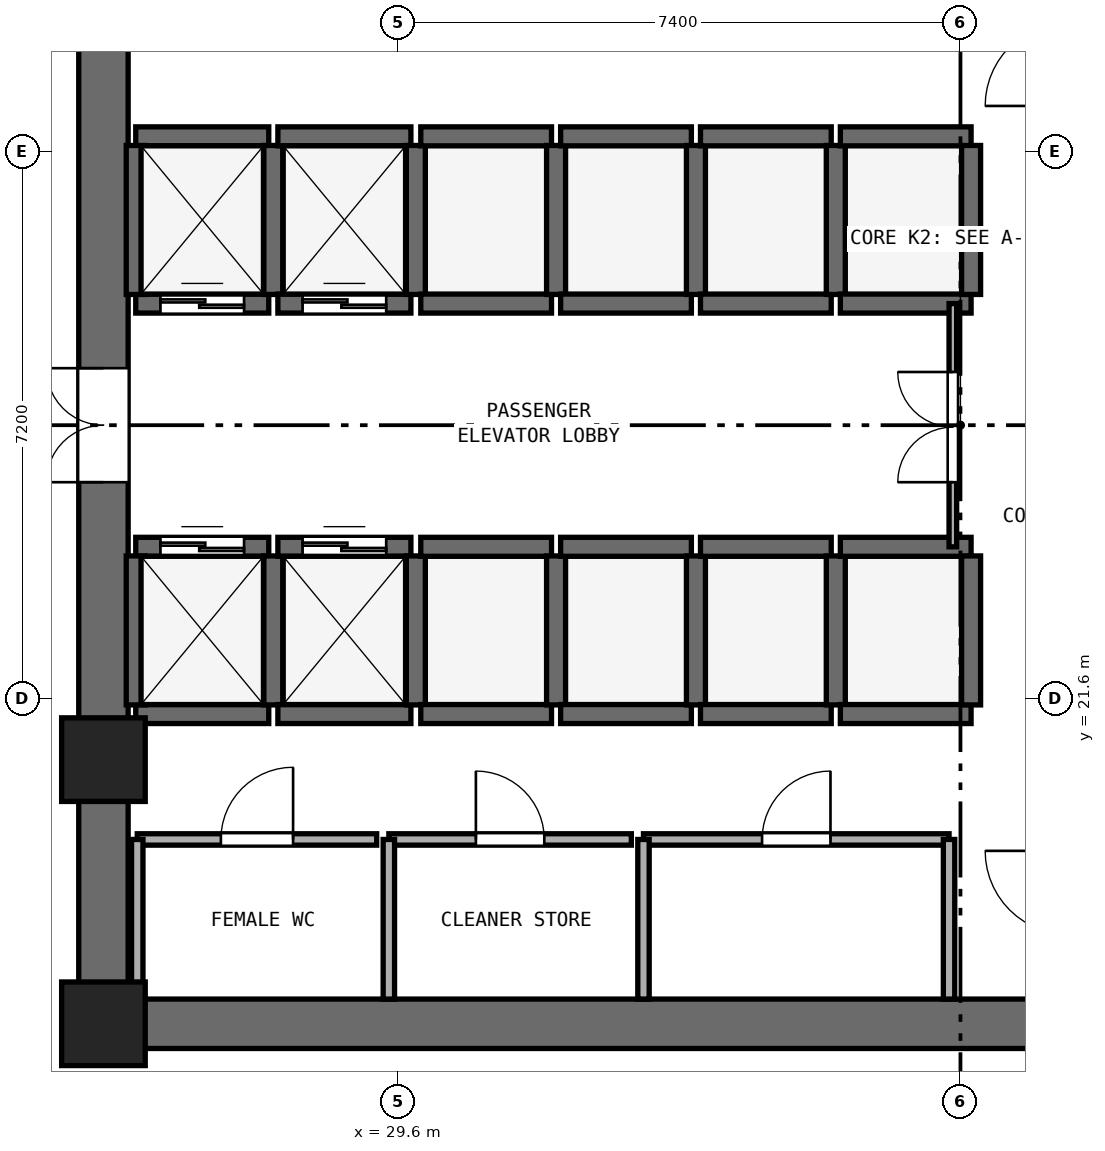
"""IFC4 building model, lengths in metres.
Left out: names, types, materials, properties, quantities, classifications, styles, units other than length and angle.
Written with IfcOpenShell. Run it as: python <this file> out.ifc"""

import sys

from ifc_helpers import new_model, si_unit, direction, frame, frame_2d, origin, origin_2d, place, context, subcontext, project, spatial, rectangle, extrude, element, fill, save


model = new_model("IFC4")
c1 = context("Model", 3, precision=1e-05, world=origin(), true_north=direction((0.0, 1.0)))
c2 = subcontext(c1, "Body", "Model", "MODEL_VIEW")
j1 = project(units=[si_unit("LENGTHUNIT", "METRE"), si_unit("PLANEANGLEUNIT", "RADIAN")], contexts=[c1])
p1 = place(None, origin())
s1 = spatial("IfcSite", under=j1, at=p1, CompositionType="ELEMENT")
p2 = place(p1, origin())
s2 = spatial("IfcBuilding", under=s1, at=p2, CompositionType="ELEMENT")
p3 = place(p2, frame((0.0, 0.0, 5.0)))
s3 = spatial("IfcBuildingStorey", under=s2, at=p3, CompositionType="ELEMENT", Elevation=5.0)
p4 = place(p3, frame((25.4, 17.325, 0.0), z_axis=(0.0, 0.0, 1.0), x_axis=(1.0, 0.0, 0.0)))
e1 = element("IfcWall", 1, at=p4, inside=s3, PredefinedType="SHEAR", context=c2, shape_type="SweptSolid", body=[
    extrude(rectangle(XDim=23.2, YDim=0.65, at=frame_2d((11.6, 0.0))), origin(), (0.0, 0.0, 1.0), 4.66),
])
p5 = place(p3, frame((25.725, 17.65, 0.0), z_axis=(0.0, 0.0, 1.0), x_axis=(0.0, 1.0, 0.0)))
e2 = element("IfcWall", 2, at=p5, inside=s3, PredefinedType="SHEAR", context=c2, shape_type="SweptSolid", body=[
    extrude(rectangle(XDim=15.1, YDim=0.65, at=frame_2d((7.55, 0.0))), origin(), (0.0, 0.0, 1.0), 4.66),
])
p6 = place(p5, frame((6.8, 0.0, 0.0)))
e3 = element("IfcOpeningElement", 3, at=p6, cuts=e2, PredefinedType="OPENING", context=c2, shape_type="SweptSolid", body=[
    extrude(rectangle(XDim=1.5, YDim=2.15, at=frame_2d((0.75, 1.075))), frame((0.0, 0.335, 0.0), z_axis=(0.0, -1.0, 0.0), x_axis=(1.0, 0.0, 0.0)), (0.0, 0.0, 1.0), 0.67),
])
for number, where, z_axis, x_axis in (
    (4, (25.725, 17.325, 0.0), (0.0, 0.0, 1.0), (1.0, 0.0, 0.0)),
    (5, (25.725, 20.8, 0.0), (0.0, 0.0, 1.0), (1.0, 0.0, 0.0)),
):
    element("IfcColumn", number, at=place(p3, frame(where, z_axis=z_axis, x_axis=x_axis)), inside=s3, PredefinedType="PILASTER", context=c2, shape_type="SweptSolid", body=[
        extrude(rectangle(XDim=1.1, YDim=1.1, at=origin_2d()), origin(), (0.0, 0.0, 1.0), 5.0),
    ])
p7 = place(p3, frame((26.15, 26.8, 0.0), z_axis=(0.0, 0.0, 1.0), x_axis=(1.0, 0.0, 0.0)))
e6 = element("IfcWall", 6, at=p7, inside=s3, PredefinedType="SHEAR", context=c2, shape_type="SweptSolid", body=[
    extrude(rectangle(XDim=1.75, YDim=0.25, at=frame_2d((0.875, 0.0))), origin(), (0.0, 0.0, 1.0), 4.66),
])
p8 = place(p7, frame((0.325, 0.0, 0.0)))
e7 = element("IfcOpeningElement", 7, at=p8, cuts=e6, PredefinedType="OPENING", context=c2, shape_type="SweptSolid", body=[
    extrude(rectangle(XDim=1.1, YDim=2.15, at=frame_2d((0.55, 1.075))), frame((0.0, 0.135, 0.0), z_axis=(0.0, -1.0, 0.0), x_axis=(1.0, 0.0, 0.0)), (0.0, 0.0, 1.0), 0.27),
])
p9 = place(p3, frame((26.15, 29.0, 0.0), z_axis=(0.0, 0.0, 1.0), x_axis=(1.0, 0.0, 0.0)))
e8 = element("IfcWall", 8, at=p9, inside=s3, PredefinedType="SHEAR", context=c2, shape_type="SweptSolid", body=[
    extrude(rectangle(XDim=1.75, YDim=0.25, at=frame_2d((0.875, 0.0))), origin(), (0.0, 0.0, 1.0), 4.66),
])
for number, where, z_axis, x_axis in (
    (9, (26.15, 26.92, 0.0), (0.0, 0.0, 1.0), (0.0, 1.0, 0.0)),
    (10, (27.96, 26.92, 0.0), (0.0, 0.0, 1.0), (0.0, 1.0, 0.0)),
):
    element("IfcWall", number, at=place(p3, frame(where, z_axis=z_axis, x_axis=x_axis)), inside=s3, PredefinedType="SHEAR", context=c2, shape_type="SweptSolid", body=[
        extrude(rectangle(XDim=1.96, YDim=0.25, at=frame_2d((0.98, 0.0))), origin(), (0.0, 0.0, 1.0), 4.66),
    ])
p10 = place(p3, frame((28.02, 26.8, 0.0), z_axis=(0.0, 0.0, 1.0), x_axis=(1.0, 0.0, 0.0)))
e11 = element("IfcWall", 11, at=p10, inside=s3, PredefinedType="SHEAR", context=c2, shape_type="SweptSolid", body=[
    extrude(rectangle(XDim=1.75, YDim=0.25, at=frame_2d((0.875, 0.0))), origin(), (0.0, 0.0, 1.0), 4.66),
])
p11 = place(p10, frame((0.325, 0.0, 0.0)))
e12 = element("IfcOpeningElement", 12, at=p11, cuts=e11, PredefinedType="OPENING", context=c2, shape_type="SweptSolid", body=[
    extrude(rectangle(XDim=1.1, YDim=2.15, at=frame_2d((0.55, 1.075))), frame((0.0, 0.135, 0.0), z_axis=(0.0, -1.0, 0.0), x_axis=(1.0, 0.0, 0.0)), (0.0, 0.0, 1.0), 0.27),
])
p12 = place(p3, frame((28.02, 29.0, 0.0), z_axis=(0.0, 0.0, 1.0), x_axis=(1.0, 0.0, 0.0)))
e13 = element("IfcWall", 13, at=p12, inside=s3, PredefinedType="SHEAR", context=c2, shape_type="SweptSolid", body=[
    extrude(rectangle(XDim=1.75, YDim=0.25, at=frame_2d((0.875, 0.0))), origin(), (0.0, 0.0, 1.0), 4.66),
])
p13 = place(p3, frame((29.835, 26.92, 0.0), z_axis=(0.0, 0.0, 1.0), x_axis=(0.0, 1.0, 0.0)))
e14 = element("IfcWall", 14, at=p13, inside=s3, PredefinedType="SHEAR", context=c2, shape_type="SweptSolid", body=[
    extrude(rectangle(XDim=1.96, YDim=0.25, at=frame_2d((0.98, 0.0))), origin(), (0.0, 0.0, 1.0), 4.66),
])
p14 = place(p3, frame((26.15, 21.4, 0.0), z_axis=(0.0, 0.0, 1.0), x_axis=(1.0, 0.0, 0.0)))
e15 = element("IfcWall", 15, at=p14, inside=s3, PredefinedType="SHEAR", context=c2, shape_type="SweptSolid", body=[
    extrude(rectangle(XDim=1.75, YDim=0.25, at=frame_2d((0.875, 0.0))), origin(), (0.0, 0.0, 1.0), 4.66),
])
p15 = place(p3, frame((26.15, 23.6, 0.0), z_axis=(0.0, 0.0, 1.0), x_axis=(1.0, 0.0, 0.0)))
e16 = element("IfcWall", 16, at=p15, inside=s3, PredefinedType="SHEAR", context=c2, shape_type="SweptSolid", body=[
    extrude(rectangle(XDim=1.75, YDim=0.25, at=frame_2d((0.875, 0.0))), origin(), (0.0, 0.0, 1.0), 4.66),
])
p16 = place(p15, frame((0.325, 0.0, 0.0)))
e17 = element("IfcOpeningElement", 17, at=p16, cuts=e16, PredefinedType="OPENING", context=c2, shape_type="SweptSolid", body=[
    extrude(rectangle(XDim=1.1, YDim=2.15, at=frame_2d((0.55, 1.075))), frame((0.0, 0.135, 0.0), z_axis=(0.0, -1.0, 0.0), x_axis=(1.0, 0.0, 0.0)), (0.0, 0.0, 1.0), 0.27),
])
for number, where, z_axis, x_axis in (
    (18, (26.15, 21.52, 0.0), (0.0, 0.0, 1.0), (0.0, 1.0, 0.0)),
    (19, (27.96, 21.52, 0.0), (0.0, 0.0, 1.0), (0.0, 1.0, 0.0)),
):
    element("IfcWall", number, at=place(p3, frame(where, z_axis=z_axis, x_axis=x_axis)), inside=s3, PredefinedType="SHEAR", context=c2, shape_type="SweptSolid", body=[
        extrude(rectangle(XDim=1.96, YDim=0.25, at=frame_2d((0.98, 0.0))), origin(), (0.0, 0.0, 1.0), 4.66),
    ])
p17 = place(p3, frame((28.02, 21.4, 0.0), z_axis=(0.0, 0.0, 1.0), x_axis=(1.0, 0.0, 0.0)))
e20 = element("IfcWall", 20, at=p17, inside=s3, PredefinedType="SHEAR", context=c2, shape_type="SweptSolid", body=[
    extrude(rectangle(XDim=1.75, YDim=0.25, at=frame_2d((0.875, 0.0))), origin(), (0.0, 0.0, 1.0), 4.66),
])
p18 = place(p3, frame((28.02, 23.6, 0.0), z_axis=(0.0, 0.0, 1.0), x_axis=(1.0, 0.0, 0.0)))
e21 = element("IfcWall", 21, at=p18, inside=s3, PredefinedType="SHEAR", context=c2, shape_type="SweptSolid", body=[
    extrude(rectangle(XDim=1.75, YDim=0.25, at=frame_2d((0.875, 0.0))), origin(), (0.0, 0.0, 1.0), 4.66),
])
p19 = place(p18, frame((0.325, 0.0, 0.0)))
e22 = element("IfcOpeningElement", 22, at=p19, cuts=e21, PredefinedType="OPENING", context=c2, shape_type="SweptSolid", body=[
    extrude(rectangle(XDim=1.1, YDim=2.15, at=frame_2d((0.55, 1.075))), frame((0.0, 0.135, 0.0), z_axis=(0.0, -1.0, 0.0), x_axis=(1.0, 0.0, 0.0)), (0.0, 0.0, 1.0), 0.27),
])
p20 = place(p3, frame((29.835, 21.52, 0.0), z_axis=(0.0, 0.0, 1.0), x_axis=(0.0, 1.0, 0.0)))
e23 = element("IfcWall", 23, at=p20, inside=s3, PredefinedType="SHEAR", context=c2, shape_type="SweptSolid", body=[
    extrude(rectangle(XDim=1.96, YDim=0.25, at=frame_2d((0.98, 0.0))), origin(), (0.0, 0.0, 1.0), 4.66),
])
for number, where, z_axis, x_axis in (
    (24, (29.9, 21.4, 0.0), (0.0, 0.0, 1.0), (1.0, 0.0, 0.0)),
    (25, (29.9, 23.6, 0.0), (0.0, 0.0, 1.0), (1.0, 0.0, 0.0)),
):
    element("IfcWall", number, at=place(p3, frame(where, z_axis=z_axis, x_axis=x_axis)), inside=s3, PredefinedType="SHEAR", context=c2, shape_type="SweptSolid", body=[
        extrude(rectangle(XDim=1.72, YDim=0.25, at=frame_2d((0.86, 0.0))), origin(), (0.0, 0.0, 1.0), 4.66),
    ])
p21 = place(p3, frame((31.68, 21.52, 0.0), z_axis=(0.0, 0.0, 1.0), x_axis=(0.0, 1.0, 0.0)))
e26 = element("IfcWall", 26, at=p21, inside=s3, PredefinedType="SHEAR", context=c2, shape_type="SweptSolid", body=[
    extrude(rectangle(XDim=1.96, YDim=0.25, at=frame_2d((0.98, 0.0))), origin(), (0.0, 0.0, 1.0), 4.66),
])
for number, where, z_axis, x_axis in (
    (27, (31.74, 21.4, 0.0), (0.0, 0.0, 1.0), (1.0, 0.0, 0.0)),
    (28, (31.74, 23.6, 0.0), (0.0, 0.0, 1.0), (1.0, 0.0, 0.0)),
):
    element("IfcWall", number, at=place(p3, frame(where, z_axis=z_axis, x_axis=x_axis)), inside=s3, PredefinedType="SHEAR", context=c2, shape_type="SweptSolid", body=[
        extrude(rectangle(XDim=1.72, YDim=0.25, at=frame_2d((0.86, 0.0))), origin(), (0.0, 0.0, 1.0), 4.66),
    ])
p22 = place(p3, frame((33.52, 21.52, 0.0), z_axis=(0.0, 0.0, 1.0), x_axis=(0.0, 1.0, 0.0)))
e29 = element("IfcWall", 29, at=p22, inside=s3, PredefinedType="SHEAR", context=c2, shape_type="SweptSolid", body=[
    extrude(rectangle(XDim=1.96, YDim=0.25, at=frame_2d((0.98, 0.0))), origin(), (0.0, 0.0, 1.0), 4.66),
])
for number, where, z_axis, x_axis in (
    (30, (33.58, 21.4, 0.0), (0.0, 0.0, 1.0), (1.0, 0.0, 0.0)),
    (31, (33.58, 23.6, 0.0), (0.0, 0.0, 1.0), (1.0, 0.0, 0.0)),
):
    element("IfcWall", number, at=place(p3, frame(where, z_axis=z_axis, x_axis=x_axis)), inside=s3, PredefinedType="SHEAR", context=c2, shape_type="SweptSolid", body=[
        extrude(rectangle(XDim=1.72, YDim=0.25, at=frame_2d((0.86, 0.0))), origin(), (0.0, 0.0, 1.0), 4.66),
    ])
p23 = place(p3, frame((35.36, 21.52, 0.0), z_axis=(0.0, 0.0, 1.0), x_axis=(0.0, 1.0, 0.0)))
e32 = element("IfcWall", 32, at=p23, inside=s3, PredefinedType="SHEAR", context=c2, shape_type="SweptSolid", body=[
    extrude(rectangle(XDim=1.96, YDim=0.25, at=frame_2d((0.98, 0.0))), origin(), (0.0, 0.0, 1.0), 4.66),
])
for number, where, z_axis, x_axis in (
    (33, (35.42, 21.4, 0.0), (0.0, 0.0, 1.0), (1.0, 0.0, 0.0)),
    (34, (35.42, 23.6, 0.0), (0.0, 0.0, 1.0), (1.0, 0.0, 0.0)),
):
    element("IfcWall", number, at=place(p3, frame(where, z_axis=z_axis, x_axis=x_axis)), inside=s3, PredefinedType="SHEAR", context=c2, shape_type="SweptSolid", body=[
        extrude(rectangle(XDim=1.72, YDim=0.25, at=frame_2d((0.86, 0.0))), origin(), (0.0, 0.0, 1.0), 4.66),
    ])
p24 = place(p3, frame((37.14, 21.52, 0.0), z_axis=(0.0, 0.0, 1.0), x_axis=(0.0, 1.0, 0.0)))
e35 = element("IfcWall", 35, at=p24, inside=s3, PredefinedType="SHEAR", context=c2, shape_type="SweptSolid", body=[
    extrude(rectangle(XDim=1.96, YDim=0.25, at=frame_2d((0.98, 0.0))), origin(), (0.0, 0.0, 1.0), 4.66),
])
for number, where, z_axis, x_axis in (
    (36, (29.9, 26.8, 0.0), (0.0, 0.0, 1.0), (1.0, 0.0, 0.0)),
    (37, (29.9, 29.0, 0.0), (0.0, 0.0, 1.0), (1.0, 0.0, 0.0)),
):
    element("IfcWall", number, at=place(p3, frame(where, z_axis=z_axis, x_axis=x_axis)), inside=s3, PredefinedType="SHEAR", context=c2, shape_type="SweptSolid", body=[
        extrude(rectangle(XDim=1.72, YDim=0.25, at=frame_2d((0.86, 0.0))), origin(), (0.0, 0.0, 1.0), 4.66),
    ])
p25 = place(p3, frame((31.68, 26.92, 0.0), z_axis=(0.0, 0.0, 1.0), x_axis=(0.0, 1.0, 0.0)))
e38 = element("IfcWall", 38, at=p25, inside=s3, PredefinedType="SHEAR", context=c2, shape_type="SweptSolid", body=[
    extrude(rectangle(XDim=1.96, YDim=0.25, at=frame_2d((0.98, 0.0))), origin(), (0.0, 0.0, 1.0), 4.66),
])
for number, where, z_axis, x_axis in (
    (39, (31.74, 26.8, 0.0), (0.0, 0.0, 1.0), (1.0, 0.0, 0.0)),
    (40, (31.74, 29.0, 0.0), (0.0, 0.0, 1.0), (1.0, 0.0, 0.0)),
):
    element("IfcWall", number, at=place(p3, frame(where, z_axis=z_axis, x_axis=x_axis)), inside=s3, PredefinedType="SHEAR", context=c2, shape_type="SweptSolid", body=[
        extrude(rectangle(XDim=1.72, YDim=0.25, at=frame_2d((0.86, 0.0))), origin(), (0.0, 0.0, 1.0), 4.66),
    ])
p26 = place(p3, frame((33.52, 26.92, 0.0), z_axis=(0.0, 0.0, 1.0), x_axis=(0.0, 1.0, 0.0)))
e41 = element("IfcWall", 41, at=p26, inside=s3, PredefinedType="SHEAR", context=c2, shape_type="SweptSolid", body=[
    extrude(rectangle(XDim=1.96, YDim=0.25, at=frame_2d((0.98, 0.0))), origin(), (0.0, 0.0, 1.0), 4.66),
])
for number, where, z_axis, x_axis in (
    (42, (33.58, 26.8, 0.0), (0.0, 0.0, 1.0), (1.0, 0.0, 0.0)),
    (43, (33.58, 29.0, 0.0), (0.0, 0.0, 1.0), (1.0, 0.0, 0.0)),
):
    element("IfcWall", number, at=place(p3, frame(where, z_axis=z_axis, x_axis=x_axis)), inside=s3, PredefinedType="SHEAR", context=c2, shape_type="SweptSolid", body=[
        extrude(rectangle(XDim=1.72, YDim=0.25, at=frame_2d((0.86, 0.0))), origin(), (0.0, 0.0, 1.0), 4.66),
    ])
p27 = place(p3, frame((35.36, 26.92, 0.0), z_axis=(0.0, 0.0, 1.0), x_axis=(0.0, 1.0, 0.0)))
e44 = element("IfcWall", 44, at=p27, inside=s3, PredefinedType="SHEAR", context=c2, shape_type="SweptSolid", body=[
    extrude(rectangle(XDim=1.96, YDim=0.25, at=frame_2d((0.98, 0.0))), origin(), (0.0, 0.0, 1.0), 4.66),
])
for number, where, z_axis, x_axis in (
    (45, (35.42, 26.8, 0.0), (0.0, 0.0, 1.0), (1.0, 0.0, 0.0)),
    (46, (35.42, 29.0, 0.0), (0.0, 0.0, 1.0), (1.0, 0.0, 0.0)),
):
    element("IfcWall", number, at=place(p3, frame(where, z_axis=z_axis, x_axis=x_axis)), inside=s3, PredefinedType="SHEAR", context=c2, shape_type="SweptSolid", body=[
        extrude(rectangle(XDim=1.72, YDim=0.25, at=frame_2d((0.86, 0.0))), origin(), (0.0, 0.0, 1.0), 4.66),
    ])
p28 = place(p3, frame((37.14, 26.92, 0.0), z_axis=(0.0, 0.0, 1.0), x_axis=(0.0, 1.0, 0.0)))
e47 = element("IfcWall", 47, at=p28, inside=s3, PredefinedType="SHEAR", context=c2, shape_type="SweptSolid", body=[
    extrude(rectangle(XDim=1.96, YDim=0.25, at=frame_2d((0.98, 0.0))), origin(), (0.0, 0.0, 1.0), 4.66),
])
p29 = place(p3, frame((26.17, 19.75, 0.0), z_axis=(0.0, 0.0, 1.0), x_axis=(1.0, 0.0, 0.0)))
e48 = element("IfcWall", 48, at=p29, inside=s3, PredefinedType="PARTITIONING", context=c2, shape_type="SweptSolid", body=[
    extrude(rectangle(XDim=3.15, YDim=0.15, at=frame_2d((1.575, 0.0))), origin(), (0.0, 0.0, 1.0), 4.66),
])
p30 = place(p29, frame((1.1, 0.0, 0.0)))
e49 = element("IfcOpeningElement", 49, at=p30, cuts=e48, PredefinedType="OPENING", context=c2, shape_type="SweptSolid", body=[
    extrude(rectangle(XDim=0.95, YDim=2.1, at=frame_2d((0.475, 1.05))), frame((0.0, 0.085, 0.0), z_axis=(0.0, -1.0, 0.0), x_axis=(1.0, 0.0, 0.0)), (0.0, 0.0, 1.0), 0.17),
])
p31 = place(p3, frame((26.17, 17.65, 0.0), z_axis=(0.0, 0.0, 1.0), x_axis=(0.0, 1.0, 0.0)))
e50 = element("IfcWall", 50, at=p31, inside=s3, PredefinedType="PARTITIONING", context=c2, shape_type="SweptSolid", body=[
    extrude(rectangle(XDim=2.1, YDim=0.15, at=frame_2d((1.05, 0.0))), origin(), (0.0, 0.0, 1.0), 4.66),
])
p32 = place(p3, frame((29.48, 19.75, 0.0), z_axis=(0.0, 0.0, 1.0), x_axis=(1.0, 0.0, 0.0)))
e51 = element("IfcWall", 51, at=p32, inside=s3, PredefinedType="PARTITIONING", context=c2, shape_type="SweptSolid", body=[
    extrude(rectangle(XDim=3.19, YDim=0.15, at=frame_2d((1.595, 0.0))), origin(), (0.0, 0.0, 1.0), 4.66),
])
p33 = place(p32, frame((1.145, 0.0, 0.0)))
e52 = element("IfcOpeningElement", 52, at=p33, cuts=e51, PredefinedType="OPENING", context=c2, shape_type="SweptSolid", body=[
    extrude(rectangle(XDim=0.9, YDim=2.1, at=frame_2d((0.45, 1.05))), frame((0.0, 0.085, 0.0), z_axis=(0.0, -1.0, 0.0), x_axis=(1.0, 0.0, 0.0)), (0.0, 0.0, 1.0), 0.17),
])
p34 = place(p3, frame((29.48, 17.65, 0.0), z_axis=(0.0, 0.0, 1.0), x_axis=(0.0, 1.0, 0.0)))
e53 = element("IfcWall", 53, at=p34, inside=s3, PredefinedType="PARTITIONING", context=c2, shape_type="SweptSolid", body=[
    extrude(rectangle(XDim=2.1, YDim=0.15, at=frame_2d((1.05, 0.0))), origin(), (0.0, 0.0, 1.0), 4.66),
])
p35 = place(p3, frame((32.83, 19.75, 0.0), z_axis=(0.0, 0.0, 1.0), x_axis=(1.0, 0.0, 0.0)))
e54 = element("IfcWall", 54, at=p35, inside=s3, PredefinedType="PARTITIONING", context=c2, shape_type="SweptSolid", body=[
    extrude(rectangle(XDim=4.02, YDim=0.15, at=frame_2d((2.01, 0.0))), origin(), (0.0, 0.0, 1.0), 4.66),
])
p36 = place(p35, frame((1.56, 0.0, 0.0)))
e55 = element("IfcOpeningElement", 55, at=p36, cuts=e54, PredefinedType="OPENING", context=c2, shape_type="SweptSolid", body=[
    extrude(rectangle(XDim=0.9, YDim=2.1, at=frame_2d((0.45, 1.05))), frame((0.0, 0.085, 0.0), z_axis=(0.0, -1.0, 0.0), x_axis=(1.0, 0.0, 0.0)), (0.0, 0.0, 1.0), 0.17),
])
for number, where, z_axis, x_axis in (
    (56, (32.83, 17.65, 0.0), (0.0, 0.0, 1.0), (0.0, 1.0, 0.0)),
    (57, (36.85, 17.65, 0.0), (0.0, 0.0, 1.0), (0.0, 1.0, 0.0)),
):
    element("IfcWall", number, at=place(p3, frame(where, z_axis=z_axis, x_axis=x_axis)), inside=s3, PredefinedType="PARTITIONING", context=c2, shape_type="SweptSolid", body=[
        extrude(rectangle(XDim=2.1, YDim=0.15, at=frame_2d((1.05, 0.0))), origin(), (0.0, 0.0, 1.0), 4.66),
    ])
p37 = place(p3, frame((36.9, 23.6, 0.0), z_axis=(0.0, 0.0, 1.0), x_axis=(0.0, 1.0, 0.0)))
e58 = element("IfcWall", 58, at=p37, inside=s3, PredefinedType="PARTITIONING", context=c2, shape_type="SweptSolid", body=[
    extrude(rectangle(XDim=3.2, YDim=0.1, at=frame_2d((1.6, 0.0))), origin(), (0.0, 0.0, 1.0), 4.66),
])
p38 = place(p37, frame((0.85, 0.0, 0.0)))
e59 = element("IfcOpeningElement", 59, at=p38, cuts=e58, PredefinedType="OPENING", context=c2, shape_type="SweptSolid", body=[
    extrude(rectangle(XDim=1.45, YDim=2.12, at=frame_2d((0.725, 1.06))), frame((0.0, 0.06, 0.0), z_axis=(0.0, -1.0, 0.0), x_axis=(1.0, 0.0, 0.0)), (0.0, 0.0, 1.0), 0.12),
])
p39 = place(p8, origin())
e60 = element("IfcDoor", 60, at=p39, inside=s3, OperationType="DOUBLE_DOOR_SLIDING", PredefinedType="DOOR", context=c2, shape_type="SweptSolid", body=[
    extrude(rectangle(XDim=1.1, YDim=2.15, at=frame_2d((0.55, 1.075))), frame((0.0, 0.025, 0.0), z_axis=(0.0, -1.0, 0.0), x_axis=(1.0, 0.0, 0.0)), (0.0, 0.0, 1.0), 0.05),
])
fill(e7, e60)
p40 = place(p11, origin())
e61 = element("IfcDoor", 61, at=p40, inside=s3, OperationType="DOUBLE_DOOR_SLIDING", PredefinedType="DOOR", context=c2, shape_type="SweptSolid", body=[
    extrude(rectangle(XDim=1.1, YDim=2.15, at=frame_2d((0.55, 1.075))), frame((0.0, 0.025, 0.0), z_axis=(0.0, -1.0, 0.0), x_axis=(1.0, 0.0, 0.0)), (0.0, 0.0, 1.0), 0.05),
])
fill(e12, e61)
p41 = place(p16, origin())
e62 = element("IfcDoor", 62, at=p41, inside=s3, OperationType="DOUBLE_DOOR_SLIDING", PredefinedType="DOOR", context=c2, shape_type="SweptSolid", body=[
    extrude(rectangle(XDim=1.1, YDim=2.15, at=frame_2d((0.55, 1.075))), frame((0.0, 0.025, 0.0), z_axis=(0.0, -1.0, 0.0), x_axis=(1.0, 0.0, 0.0)), (0.0, 0.0, 1.0), 0.05),
])
fill(e17, e62)
p42 = place(p19, origin())
e63 = element("IfcDoor", 63, at=p42, inside=s3, OperationType="DOUBLE_DOOR_SLIDING", PredefinedType="DOOR", context=c2, shape_type="SweptSolid", body=[
    extrude(rectangle(XDim=1.1, YDim=2.15, at=frame_2d((0.55, 1.075))), frame((0.0, 0.025, 0.0), z_axis=(0.0, -1.0, 0.0), x_axis=(1.0, 0.0, 0.0)), (0.0, 0.0, 1.0), 0.05),
])
fill(e22, e63)
p43 = place(p6, origin())
e64 = element("IfcDoor", 64, at=p43, inside=s3, OperationType="DOUBLE_DOOR_SINGLE_SWING", PredefinedType="DOOR", context=c2, shape_type="SweptSolid", body=[
    extrude(rectangle(XDim=1.5, YDim=2.15, at=frame_2d((0.75, 1.075))), frame((0.0, 0.025, 0.0), z_axis=(0.0, -1.0, 0.0), x_axis=(1.0, 0.0, 0.0)), (0.0, 0.0, 1.0), 0.05),
])
fill(e3, e64)
p44 = place(p30, origin())
e65 = element("IfcDoor", 65, at=p44, inside=s3, OperationType="SINGLE_SWING_RIGHT", PredefinedType="DOOR", context=c2, shape_type="SweptSolid", body=[
    extrude(rectangle(XDim=0.95, YDim=2.1, at=frame_2d((0.475, 1.05))), frame((0.0, 0.025, 0.0), z_axis=(0.0, -1.0, 0.0), x_axis=(1.0, 0.0, 0.0)), (0.0, 0.0, 1.0), 0.05),
])
fill(e49, e65)
p45 = place(p33, origin())
e66 = element("IfcDoor", 66, at=p45, inside=s3, OperationType="SINGLE_SWING_LEFT", PredefinedType="DOOR", context=c2, shape_type="SweptSolid", body=[
    extrude(rectangle(XDim=0.9, YDim=2.1, at=frame_2d((0.45, 1.05))), frame((0.0, 0.025, 0.0), z_axis=(0.0, -1.0, 0.0), x_axis=(1.0, 0.0, 0.0)), (0.0, 0.0, 1.0), 0.05),
])
fill(e52, e66)
p46 = place(p36, origin())
e67 = element("IfcDoor", 67, at=p46, inside=s3, OperationType="SINGLE_SWING_RIGHT", PredefinedType="DOOR", context=c2, shape_type="SweptSolid", body=[
    extrude(rectangle(XDim=0.9, YDim=2.1, at=frame_2d((0.45, 1.05))), frame((0.0, 0.025, 0.0), z_axis=(0.0, -1.0, 0.0), x_axis=(1.0, 0.0, 0.0)), (0.0, 0.0, 1.0), 0.05),
])
fill(e55, e67)
p47 = place(p38, origin())
e68 = element("IfcDoor", 68, at=p47, inside=s3, OperationType="DOUBLE_DOOR_SINGLE_SWING", PredefinedType="DOOR", context=c2, shape_type="SweptSolid", body=[
    extrude(rectangle(XDim=1.45, YDim=2.12, at=frame_2d((0.725, 1.06))), frame((0.0, 0.025, 0.0), z_axis=(0.0, -1.0, 0.0), x_axis=(1.0, 0.0, 0.0)), (0.0, 0.0, 1.0), 0.05),
])
fill(e59, e68)
save(model, sys.argv[1])
